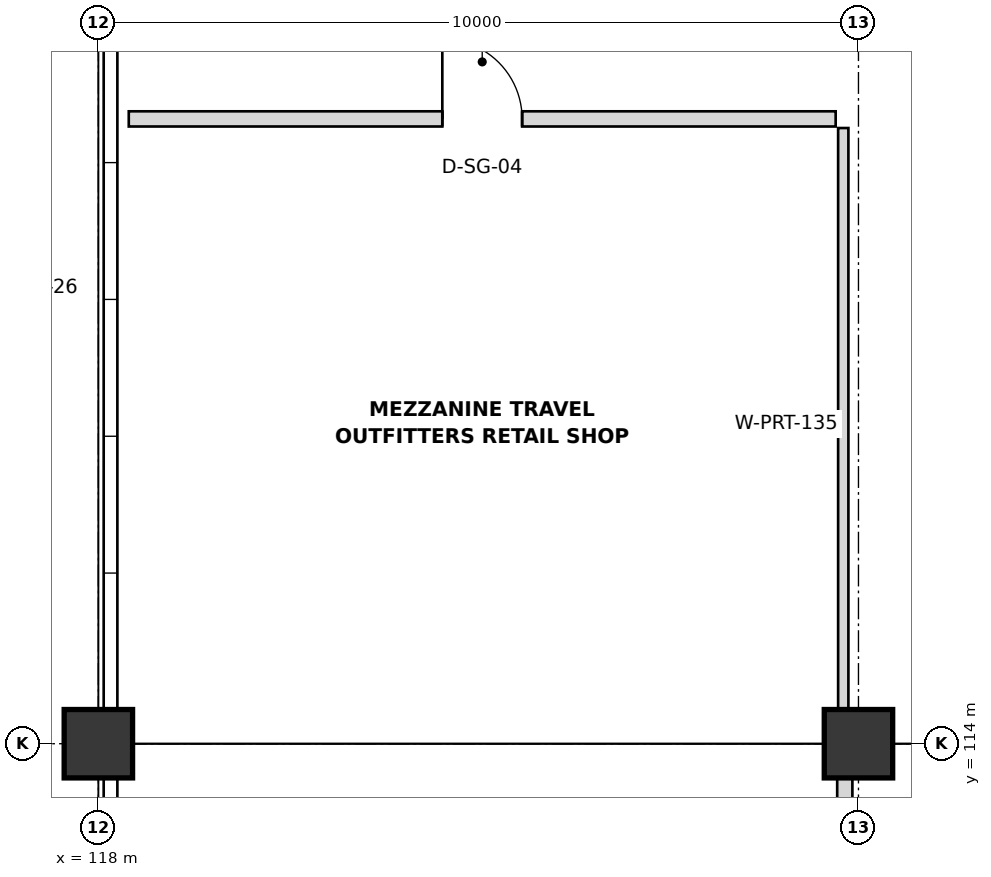
"""IFC4 building model, lengths in metres.
Left out: names, types, materials, properties, quantities, classifications, styles, units other than length and angle.
Written with IfcOpenShell. Run it as: python <this file> out.ifc"""

import sys

from ifc_helpers import new_model, si_unit, direction, frame, frame_2d, origin, origin_2d, place, context, subcontext, project, spatial, rectangle, extrude, element, fill, save


model = new_model("IFC4")
c1 = context("Model", 3, precision=1e-05, world=origin(), true_north=direction((0.0, 1.0)))
c2 = subcontext(c1, "Body", "Model", "MODEL_VIEW")
j1 = project(units=[si_unit("LENGTHUNIT", "METRE"), si_unit("PLANEANGLEUNIT", "RADIAN")], contexts=[c1])
p1 = place(None, origin())
s1 = spatial("IfcSite", under=j1, at=p1, CompositionType="ELEMENT")
p2 = place(p1, origin())
s2 = spatial("IfcBuilding", under=s1, at=p2, CompositionType="ELEMENT")
p3 = place(p2, frame((0.0, 0.0, 5.4)))
s3 = spatial("IfcBuildingStorey", under=s2, at=p3, CompositionType="ELEMENT", Elevation=5.4)
for number, where, z_axis, x_axis in (
    (1, (118.0, 114.0, 0.0), (0.0, 0.0, 1.0), (1.0, 0.0, 0.0)),
    (2, (128.0, 114.0, 0.0), (0.0, 0.0, 1.0), (1.0, 0.0, 0.0)),
):
    element("IfcColumn", number, at=place(p3, frame(where, z_axis=z_axis, x_axis=x_axis)), inside=s3, PredefinedType="COLUMN", context=c2, shape_type="SweptSolid", body=[
        extrude(rectangle(XDim=0.9, YDim=0.9, at=origin_2d()), origin(), (0.0, 0.0, 1.0), 4.2),
    ])
p4 = place(p3, frame((118.4, 122.22, 0.0), z_axis=(0.0, 0.0, 1.0), x_axis=(1.0, 0.0, 0.0)))
e3 = element("IfcWall", 3, at=p4, inside=s3, PredefinedType="PARTITIONING", context=c2, shape_type="SweptSolid", body=[
    extrude(rectangle(XDim=9.3, YDim=0.2, at=frame_2d((4.65, 0.0))), origin(), (0.0, 0.0, 1.0), 3.118),
])
p5 = place(p4, frame((4.125, 0.0, 0.0)))
e4 = element("IfcOpeningElement", 4, at=p5, cuts=e3, PredefinedType="OPENING", context=c2, shape_type="SweptSolid", body=[
    extrude(rectangle(XDim=1.05, YDim=2.1, at=frame_2d((0.525, 1.05))), frame((0.0, 0.11, 0.0), z_axis=(0.0, -1.0, 0.0), x_axis=(1.0, 0.0, 0.0)), (0.0, 0.0, 1.0), 0.22),
])
p6 = place(p3, frame((127.8, 114.3, 0.0), z_axis=(0.0, 0.0, 1.0), x_axis=(0.0, 1.0, 0.0)))
e5 = element("IfcWall", 5, at=p6, inside=s3, PredefinedType="PARTITIONING", context=c2, shape_type="SweptSolid", body=[
    extrude(rectangle(XDim=7.8, YDim=0.135, at=frame_2d((3.9, 0.0))), origin(), (0.0, 0.0, 1.0), 3.018),
])
p7 = place(p3, frame((127.82, 90.4, 0.0), z_axis=(0.0, 0.0, 1.0), x_axis=(0.0, 1.0, 0.0)))
e6 = element("IfcWall", 6, at=p7, inside=s3, PredefinedType="PARTITIONING", context=c2, shape_type="SweptSolid", body=[
    extrude(rectangle(XDim=23.3, YDim=0.2, at=frame_2d((11.65, 0.0))), origin(), (0.0, 0.0, 1.0), 3.018),
])
p8 = place(p7, frame((17.125, 0.0, 0.0)))
e7 = element("IfcOpeningElement", 7, at=p8, cuts=e6, PredefinedType="OPENING", context=c2, shape_type="SweptSolid", body=[
    extrude(rectangle(XDim=0.95, YDim=2.3, at=frame_2d((0.475, 1.15))), frame((0.0, 0.11, 0.0), z_axis=(0.0, -1.0, 0.0), x_axis=(1.0, 0.0, 0.0)), (0.0, 0.0, 1.0), 0.22),
])
p9 = place(p5, origin())
e8 = element("IfcDoor", 8, at=p9, inside=s3, OperationType="SINGLE_SWING_LEFT", PredefinedType="DOOR", context=c2, shape_type="SweptSolid", body=[
    extrude(rectangle(XDim=1.05, YDim=2.1, at=frame_2d((0.525, 1.05))), frame((0.0, 0.025, 0.0), z_axis=(0.0, -1.0, 0.0), x_axis=(1.0, 0.0, 0.0)), (0.0, 0.0, 1.0), 0.05),
])
fill(e4, e8)
save(model, sys.argv[1])
